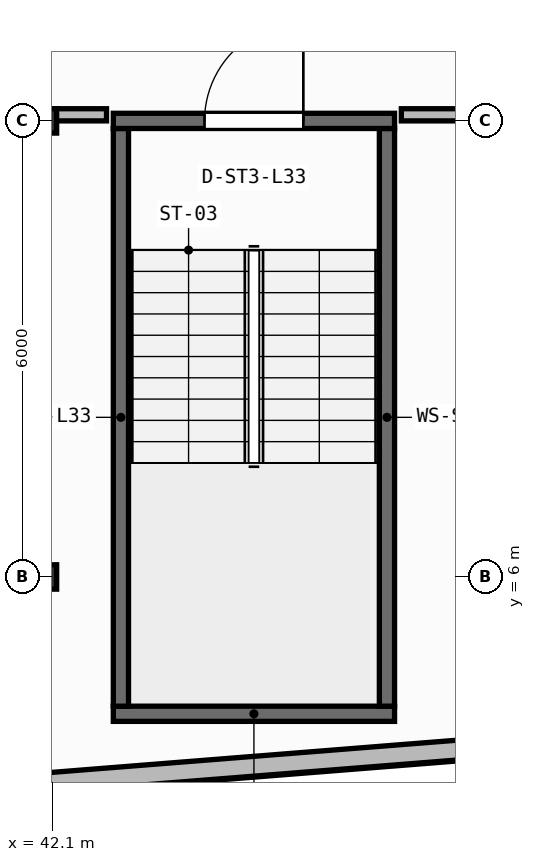
"""IFC4 building model, lengths in metres.
Left out: names, types, materials, properties, quantities, classifications, styles, units other than length and angle.
Written with IfcOpenShell. Run it as: python <this file> out.ifc"""

import sys

from ifc_helpers import new_model, si_unit, direction, frame, frame_2d, origin, origin_2d, place, context, subcontext, project, spatial, rectangle, i_section, extrude, element, fill, save


model = new_model("IFC4")
c1 = context("Model", 3, precision=1e-05, world=origin(), true_north=direction((0.0, 1.0)))
c2 = subcontext(c1, "Body", "Model", "MODEL_VIEW")
j1 = project(units=[si_unit("LENGTHUNIT", "METRE"), si_unit("PLANEANGLEUNIT", "RADIAN")], contexts=[c1])
p1 = place(None, origin())
s1 = spatial("IfcSite", under=j1, at=p1, CompositionType="ELEMENT")
p2 = place(p1, origin())
s2 = spatial("IfcBuilding", under=s1, at=p2, CompositionType="ELEMENT")
p3 = place(p2, frame((0.0, 0.0, 134.95)))
s3 = spatial("IfcBuildingStorey", under=s2, at=p3, CompositionType="ELEMENT", Elevation=134.95)
for number, where, z_axis, x_axis in (
    (1, (42.0, 6.0, 0.0), (0.0, 0.0, 1.0), (1.0, 0.0, 0.0)),
    (2, (42.0, 12.0, 0.0), (0.0, 0.0, 1.0), (1.0, 0.0, 0.0)),
):
    element("IfcColumn", number, at=place(p3, frame(where, z_axis=z_axis, x_axis=x_axis)), inside=s3, PredefinedType="COLUMN", context=c2, shape_type="SweptSolid", body=[
        extrude(i_section(OverallWidth=0.309, OverallDepth=0.321, WebThickness=0.014, FlangeThickness=0.022, FilletRadius=0.017, at=origin_2d()), origin(), (0.0, 0.0, 1.0), 3.95),
    ])
p4 = place(p3, frame((2.76, 0.173, 0.0), z_axis=(0.0, 0.0, 1.0), x_axis=(0.996857931723, 0.079210251617, 0.0)))
e3 = element("IfcWall", 3, at=p4, inside=s3, PredefinedType="STANDARD", context=c2, shape_type="SweptSolid", body=[
    extrude(rectangle(XDim=51.442, YDim=0.26, at=frame_2d((25.721, 0.0))), origin(), (0.0, 0.0, 1.0), 3.71),
])
p5 = place(p4, frame((24.521, 0.0, 0.9)))
e4 = element("IfcOpeningElement", 4, at=p5, cuts=e3, PredefinedType="OPENING", context=c2, shape_type="SweptSolid", body=[
    extrude(rectangle(XDim=2.4, YDim=1.65, at=frame_2d((1.2, 0.825))), frame((0.0, 0.14, 0.0), z_axis=(0.0, -1.0, 0.0), x_axis=(1.0, 0.0, 0.0)), (0.0, 0.0, 1.0), 0.28),
])
p6 = place(p3, frame((42.9, 4.2, 0.0), z_axis=(0.0, 0.0, 1.0), x_axis=(1.0, 0.0, 0.0)))
e5 = element("IfcWall", 5, at=p6, inside=s3, PredefinedType="SHEAR", context=c2, shape_type="SweptSolid", body=[
    extrude(rectangle(XDim=3.7, YDim=0.2, at=frame_2d((1.85, 0.0))), origin(), (0.0, 0.0, 1.0), 3.71),
])
for number, where, z_axis, x_axis in (
    (6, (43.0, 4.3, 0.0), (0.0, 0.0, 1.0), (0.0, 1.0, 0.0)),
    (7, (46.5, 4.3, 0.0), (0.0, 0.0, 1.0), (0.0, 1.0, 0.0)),
):
    element("IfcWall", number, at=place(p3, frame(where, z_axis=z_axis, x_axis=x_axis)), inside=s3, PredefinedType="SHEAR", context=c2, shape_type="SweptSolid", body=[
        extrude(rectangle(XDim=7.6, YDim=0.2, at=frame_2d((3.8, 0.0))), origin(), (0.0, 0.0, 1.0), 3.71),
    ])
p7 = place(p3, frame((42.9, 12.0, 0.0), z_axis=(0.0, 0.0, 1.0), x_axis=(1.0, 0.0, 0.0)))
e8 = element("IfcWall", 8, at=p7, inside=s3, PredefinedType="SHEAR", context=c2, shape_type="SweptSolid", body=[
    extrude(rectangle(XDim=3.7, YDim=0.2, at=frame_2d((1.85, 0.0))), origin(), (0.0, 0.0, 1.0), 3.71),
])
p8 = place(p7, frame((1.2, 0.0, 0.0)))
e9 = element("IfcOpeningElement", 9, at=p8, cuts=e8, PredefinedType="OPENING", context=c2, shape_type="SweptSolid", body=[
    extrude(rectangle(XDim=1.3, YDim=2.15, at=frame_2d((0.65, 1.075))), frame((0.0, 0.11, 0.0), z_axis=(0.0, -1.0, 0.0), x_axis=(1.0, 0.0, 0.0)), (0.0, 0.0, 1.0), 0.22),
])
p9 = place(p3, frame((40.03, 12.08, 0.0), z_axis=(0.0, 0.0, 1.0), x_axis=(1.0, 0.0, 0.0)))
e10 = element("IfcWall", 10, at=p9, inside=s3, PredefinedType="PARTITIONING", context=c2, shape_type="SweptSolid", body=[
    extrude(rectangle(XDim=2.781, YDim=0.16, at=frame_2d((1.39, 0.0))), origin(), (0.0, 0.0, 1.0), 3.083),
])
p10 = place(p3, frame((46.689, 12.08, 0.0), z_axis=(0.0, 0.0, 1.0), x_axis=(1.0, 0.0, 0.0)))
e11 = element("IfcWall", 11, at=p10, inside=s3, PredefinedType="PARTITIONING", context=c2, shape_type="SweptSolid", body=[
    extrude(rectangle(XDim=3.011, YDim=0.16, at=frame_2d((1.505, 0.0))), origin(), (0.0, 0.0, 1.0), 3.083),
])
p11 = place(p8, origin())
e12 = element("IfcDoor", 12, at=p11, inside=s3, OperationType="SINGLE_SWING_RIGHT", PredefinedType="DOOR", context=c2, shape_type="SweptSolid", body=[
    extrude(rectangle(XDim=1.3, YDim=2.15, at=frame_2d((0.65, 1.075))), frame((0.0, 0.025, 0.0), z_axis=(0.0, -1.0, 0.0), x_axis=(1.0, 0.0, 0.0)), (0.0, 0.0, 1.0), 0.05),
])
fill(e9, e12)
save(model, sys.argv[1])
